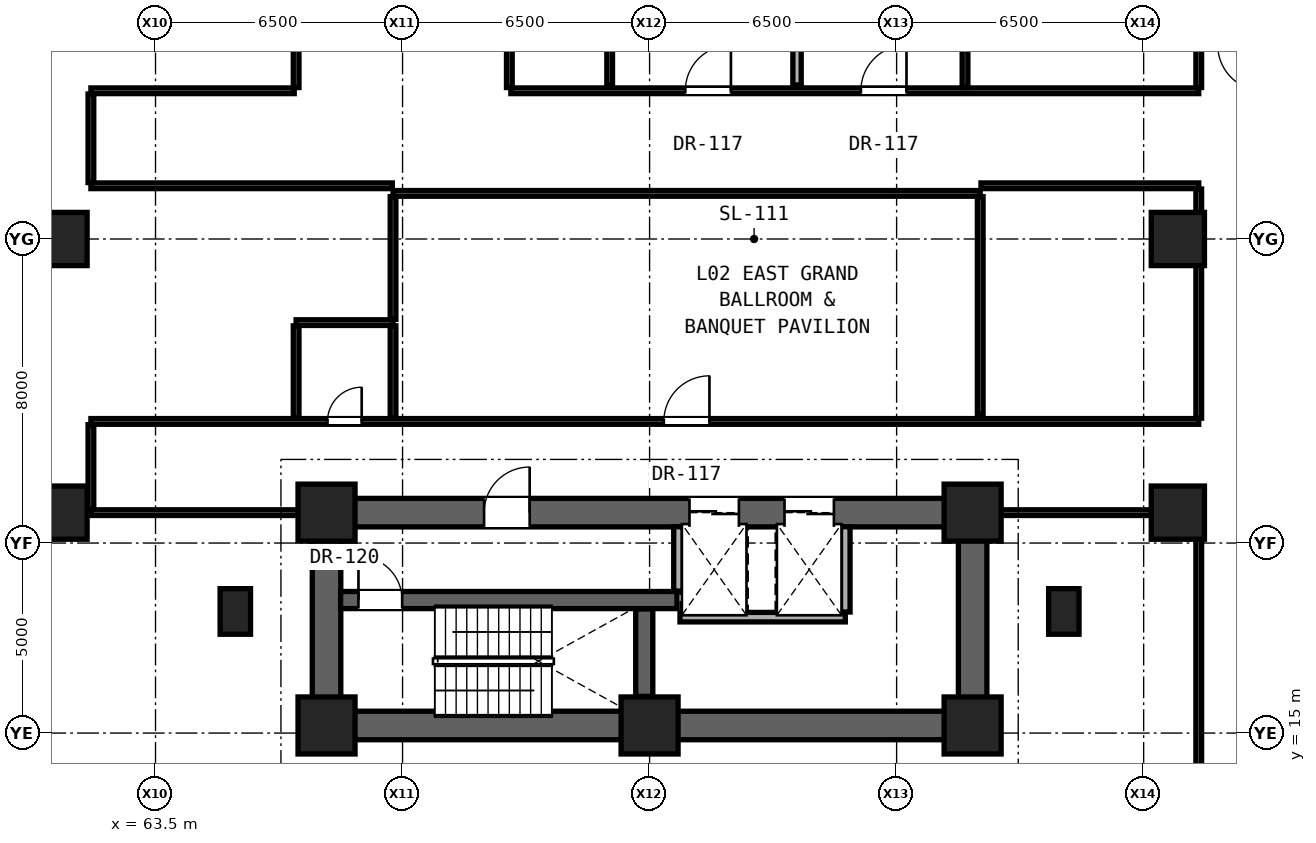
"""IFC4 building model, lengths in metres.
Left out: names, types, materials, properties, quantities, classifications, styles, units other than length and angle.
Written with IfcOpenShell. Run it as: python <this file> out.ifc"""

import sys

from ifc_helpers import new_model, si_unit, direction, frame, frame_2d, origin, origin_2d, place, context, subcontext, project, spatial, rectangle, hollow_rectangle, extrude, element, fill, save


model = new_model("IFC4")
c1 = context("Model", 3, precision=1e-05, world=origin(), true_north=direction((0.0, 1.0)))
c2 = subcontext(c1, "Body", "Model", "MODEL_VIEW")
j1 = project(units=[si_unit("LENGTHUNIT", "METRE"), si_unit("PLANEANGLEUNIT", "RADIAN")], contexts=[c1])
p1 = place(None, origin())
s1 = spatial("IfcSite", under=j1, at=p1, CompositionType="ELEMENT")
p2 = place(p1, origin())
s2 = spatial("IfcBuilding", under=s1, at=p2, CompositionType="ELEMENT")
p3 = place(p2, frame((0.0, 0.0, 9.5)))
s3 = spatial("IfcBuildingStorey", under=s2, at=p3, CompositionType="ELEMENT", Elevation=9.5)
for number, where, z_axis, x_axis in (
    (1, (68.0, 15.2, 0.0), (0.0, 0.0, 1.0), (1.0, 0.0, 0.0)),
    (2, (76.5, 15.2, 0.0), (0.0, 0.0, 1.0), (1.0, 0.0, 0.0)),
    (3, (85.0, 15.2, 0.0), (0.0, 0.0, 1.0), (1.0, 0.0, 0.0)),
    (4, (68.0, 20.8, 0.0), (0.0, 0.0, 1.0), (1.0, 0.0, 0.0)),
    (5, (85.0, 20.8, 0.0), (0.0, 0.0, 1.0), (1.0, 0.0, 0.0)),
):
    element("IfcColumn", number, at=place(p3, frame(where, z_axis=z_axis, x_axis=x_axis)), inside=s3, PredefinedType="COLUMN", context=c2, shape_type="SweptSolid", body=[
        extrude(rectangle(XDim=1.5, YDim=1.5, at=origin_2d()), origin(), (0.0, 0.0, 1.0), 4.3),
    ])
for number, where, z_axis, x_axis in (
    (6, (61.0, 20.8, 0.0), (0.0, 0.0, 1.0), (1.0, 0.0, 0.0)),
    (7, (61.0, 28.0, 0.0), (0.0, 0.0, 1.0), (1.0, 0.0, 0.0)),
    (8, (90.4, 20.8, 0.0), (0.0, 0.0, 1.0), (1.0, 0.0, 0.0)),
    (9, (90.4, 28.0, 0.0), (0.0, 0.0, 1.0), (1.0, 0.0, 0.0)),
):
    element("IfcColumn", number, at=place(p3, frame(where, z_axis=z_axis, x_axis=x_axis)), inside=s3, PredefinedType="COLUMN", context=c2, shape_type="SweptSolid", body=[
        extrude(hollow_rectangle(XDim=1.4, YDim=1.4, WallThickness=0.08, at=origin_2d()), origin(), (0.0, 0.0, 1.0), 4.3),
    ])
for number, where, z_axis, x_axis in (
    (10, (65.6, 18.2, 0.0), (0.0, 0.0, 1.0), (1.0, 0.0, 0.0)),
    (11, (87.4, 18.2, 0.0), (0.0, 0.0, 1.0), (1.0, 0.0, 0.0)),
):
    element("IfcColumn", number, at=place(p3, frame(where, z_axis=z_axis, x_axis=x_axis)), inside=s3, PredefinedType="PILASTER", context=c2, shape_type="SweptSolid", body=[
        extrude(rectangle(XDim=0.8, YDim=1.2, at=origin_2d()), origin(), (0.0, 0.0, 1.0), 4.3),
    ])
p4 = place(p3, frame((68.0, 15.2, 0.0), z_axis=(0.0, 0.0, 1.0), x_axis=(1.0, 0.0, 0.0)))
e12 = element("IfcWall", 12, at=p4, inside=s3, PredefinedType="SHEAR", context=c2, shape_type="SweptSolid", body=[
    extrude(rectangle(XDim=17.0, YDim=0.75, at=frame_2d((8.5, 0.0))), origin(), (0.0, 0.0, 1.0), 3.98),
])
for number, where, z_axis, x_axis in (
    (13, (68.0, 15.2, 0.0), (0.0, 0.0, 1.0), (0.0, 1.0, 0.0)),
    (14, (85.0, 15.2, 0.0), (0.0, 0.0, 1.0), (0.0, 1.0, 0.0)),
):
    element("IfcWall", number, at=place(p3, frame(where, z_axis=z_axis, x_axis=x_axis)), inside=s3, PredefinedType="SHEAR", context=c2, shape_type="SweptSolid", body=[
        extrude(rectangle(XDim=5.6, YDim=0.75, at=frame_2d((2.8, 0.0))), origin(), (0.0, 0.0, 1.0), 3.98),
    ])
p5 = place(p3, frame((68.0, 20.8, 0.0), z_axis=(0.0, 0.0, 1.0), x_axis=(1.0, 0.0, 0.0)))
e15 = element("IfcWall", 15, at=p5, inside=s3, PredefinedType="SHEAR", context=c2, shape_type="SweptSolid", body=[
    extrude(rectangle(XDim=17.0, YDim=0.75, at=frame_2d((8.5, 0.0))), origin(), (0.0, 0.0, 1.0), 3.98),
])
p6 = place(p5, frame((4.145, 0.0, 0.0)))
e16 = element("IfcOpeningElement", 16, at=p6, cuts=e15, PredefinedType="OPENING", context=c2, shape_type="SweptSolid", body=[
    extrude(rectangle(XDim=1.2, YDim=2.25, at=frame_2d((0.6, 1.125))), frame((0.0, 0.385, 0.0), z_axis=(0.0, -1.0, 0.0), x_axis=(1.0, 0.0, 0.0)), (0.0, 0.0, 1.0), 0.77),
])
p7 = place(p5, frame((9.55, 0.0, 0.0)))
e17 = element("IfcOpeningElement", 17, at=p7, cuts=e15, PredefinedType="OPENING", context=c2, shape_type="SweptSolid", body=[
    extrude(rectangle(XDim=1.3, YDim=2.3, at=frame_2d((0.65, 1.15))), frame((0.0, 0.385, 0.0), z_axis=(0.0, -1.0, 0.0), x_axis=(1.0, 0.0, 0.0)), (0.0, 0.0, 1.0), 0.77),
])
p8 = place(p5, frame((12.05, 0.0, 0.0)))
e18 = element("IfcOpeningElement", 18, at=p8, cuts=e15, PredefinedType="OPENING", context=c2, shape_type="SweptSolid", body=[
    extrude(rectangle(XDim=1.3, YDim=2.3, at=frame_2d((0.65, 1.15))), frame((0.0, 0.385, 0.0), z_axis=(0.0, -1.0, 0.0), x_axis=(1.0, 0.0, 0.0)), (0.0, 0.0, 1.0), 0.77),
])
p9 = place(p3, frame((77.3, 18.05, 0.0), z_axis=(0.0, 0.0, 1.0), x_axis=(1.0, 0.0, 0.0)))
e19 = element("IfcWall", 19, at=p9, inside=s3, PredefinedType="SOLIDWALL", context=c2, shape_type="SweptSolid", body=[
    extrude(rectangle(XDim=4.35, YDim=0.25, at=frame_2d((2.175, 0.0))), origin(), (0.0, 0.0, 1.0), 3.98),
])
p10 = place(p3, frame((68.37, 18.5, 0.0), z_axis=(0.0, 0.0, 1.0), x_axis=(1.0, 0.0, 0.0)))
e20 = element("IfcWall", 20, at=p10, inside=s3, PredefinedType="SHEAR", context=c2, shape_type="SweptSolid", body=[
    extrude(rectangle(XDim=8.85, YDim=0.45, at=frame_2d((4.425, 0.0))), origin(), (0.0, 0.0, 1.0), 3.98),
])
p11 = place(p10, frame((0.47, 0.0, 0.0)))
e21 = element("IfcOpeningElement", 21, at=p11, cuts=e20, PredefinedType="OPENING", context=c2, shape_type="SweptSolid", body=[
    extrude(rectangle(XDim=1.15, YDim=2.2, at=frame_2d((0.575, 1.1))), frame((0.0, 0.235, 0.0), z_axis=(0.0, -1.0, 0.0), x_axis=(1.0, 0.0, 0.0)), (0.0, 0.0, 1.0), 0.47),
])
p12 = place(p3, frame((61.8, 20.8, 0.0), z_axis=(0.0, 0.0, 1.0), x_axis=(1.0, 0.0, 0.0)))
e22 = element("IfcWall", 22, at=p12, inside=s3, PredefinedType="PARTITIONING", context=c2, shape_type="SweptSolid", body=[
    extrude(rectangle(XDim=5.83, YDim=0.15, at=frame_2d((2.915, 0.0))), origin(), (0.0, 0.0, 1.0), 2.872),
])
p13 = place(p3, frame((85.37, 20.8, 0.0), z_axis=(0.0, 0.0, 1.0), x_axis=(1.0, 0.0, 0.0)))
e23 = element("IfcWall", 23, at=p13, inside=s3, PredefinedType="PARTITIONING", context=c2, shape_type="SweptSolid", body=[
    extrude(rectangle(XDim=5.58, YDim=0.15, at=frame_2d((2.79, 0.0))), origin(), (0.0, 0.0, 1.0), 2.872),
])
p14 = place(p3, frame((61.8, 23.2, 0.0), z_axis=(0.0, 0.0, 1.0), x_axis=(1.0, 0.0, 0.0)))
e24 = element("IfcWall", 24, at=p14, inside=s3, PredefinedType="PARTITIONING", context=c2, shape_type="SweptSolid", body=[
    extrude(rectangle(XDim=29.15, YDim=0.15, at=frame_2d((14.575, 0.0))), origin(), (0.0, 0.0, 1.0), 3.045),
])
p15 = place(p14, frame((6.225, 0.0, 0.0)))
e25 = element("IfcOpeningElement", 25, at=p15, cuts=e24, PredefinedType="OPENING", context=c2, shape_type="SweptSolid", body=[
    extrude(rectangle(XDim=0.9, YDim=2.1, at=frame_2d((0.45, 1.05))), frame((0.0, 0.085, 0.0), z_axis=(0.0, -1.0, 0.0), x_axis=(1.0, 0.0, 0.0)), (0.0, 0.0, 1.0), 0.17),
])
p16 = place(p14, frame((15.075, 0.0, 0.0)))
e26 = element("IfcOpeningElement", 26, at=p16, cuts=e24, PredefinedType="OPENING", context=c2, shape_type="SweptSolid", body=[
    extrude(rectangle(XDim=1.2, YDim=2.25, at=frame_2d((0.6, 1.125))), frame((0.0, 0.085, 0.0), z_axis=(0.0, -1.0, 0.0), x_axis=(1.0, 0.0, 0.0)), (0.0, 0.0, 1.0), 0.17),
])
p17 = place(p3, frame((67.2, 25.8, 0.0), z_axis=(0.0, 0.0, 1.0), x_axis=(1.0, 0.0, 0.0)))
e27 = element("IfcWall", 27, at=p17, inside=s3, PredefinedType="PARTITIONING", context=c2, shape_type="SweptSolid", body=[
    extrude(rectangle(XDim=2.55, YDim=0.15, at=frame_2d((1.275, 0.0))), origin(), (0.0, 0.0, 1.0), 3.045),
])
p18 = place(p3, frame((69.75, 29.2, 0.0), z_axis=(0.0, 0.0, 1.0), x_axis=(1.0, 0.0, 0.0)))
e28 = element("IfcWall", 28, at=p18, inside=s3, PredefinedType="PARTITIONING", context=c2, shape_type="SweptSolid", body=[
    extrude(rectangle(XDim=15.45, YDim=0.15, at=frame_2d((7.725, 0.0))), origin(), (0.0, 0.0, 1.0), 3.045),
])
p19 = place(p3, frame((61.8, 29.4, 0.0), z_axis=(0.0, 0.0, 1.0), x_axis=(1.0, 0.0, 0.0)))
e29 = element("IfcWall", 29, at=p19, inside=s3, PredefinedType="PARTITIONING", context=c2, shape_type="SweptSolid", body=[
    extrude(rectangle(XDim=7.93, YDim=0.15, at=frame_2d((3.965, 0.0))), origin(), (0.0, 0.0, 1.0), 3.045),
])
p20 = place(p3, frame((85.22, 29.4, 0.0), z_axis=(0.0, 0.0, 1.0), x_axis=(1.0, 0.0, 0.0)))
e30 = element("IfcWall", 30, at=p20, inside=s3, PredefinedType="PARTITIONING", context=c2, shape_type="SweptSolid", body=[
    extrude(rectangle(XDim=5.73, YDim=0.15, at=frame_2d((2.865, 0.0))), origin(), (0.0, 0.0, 1.0), 3.116),
])
p21 = place(p3, frame((61.8, 31.9, 0.0), z_axis=(0.0, 0.0, 1.0), x_axis=(1.0, 0.0, 0.0)))
e31 = element("IfcWall", 31, at=p21, inside=s3, PredefinedType="PARTITIONING", context=c2, shape_type="SweptSolid", body=[
    extrude(rectangle(XDim=5.35, YDim=0.15, at=frame_2d((2.675, 0.0))), origin(), (0.0, 0.0, 1.0), 3.98),
])
p22 = place(p3, frame((72.85, 31.9, 0.0), z_axis=(0.0, 0.0, 1.0), x_axis=(1.0, 0.0, 0.0)))
e32 = element("IfcWall", 32, at=p22, inside=s3, PredefinedType="PARTITIONING", context=c2, shape_type="SweptSolid", body=[
    extrude(rectangle(XDim=18.1, YDim=0.15, at=frame_2d((9.05, 0.0))), origin(), (0.0, 0.0, 1.0), 3.045),
])
p23 = place(p22, frame((9.21, 0.0, 0.0)))
e33 = element("IfcOpeningElement", 33, at=p23, cuts=e32, PredefinedType="OPENING", context=c2, shape_type="SweptSolid", body=[
    extrude(rectangle(XDim=1.2, YDim=2.25, at=frame_2d((0.6, 1.125))), frame((0.0, 0.085, 0.0), z_axis=(0.0, -1.0, 0.0), x_axis=(1.0, 0.0, 0.0)), (0.0, 0.0, 1.0), 0.17),
])
p24 = place(p22, frame((4.59, 0.0, 0.0)))
e34 = element("IfcOpeningElement", 34, at=p24, cuts=e32, PredefinedType="OPENING", context=c2, shape_type="SweptSolid", body=[
    extrude(rectangle(XDim=1.2, YDim=2.25, at=frame_2d((0.6, 1.125))), frame((0.0, 0.085, 0.0), z_axis=(0.0, -1.0, 0.0), x_axis=(1.0, 0.0, 0.0)), (0.0, 0.0, 1.0), 0.17),
])
p25 = place(p3, frame((61.8, 20.885, 0.0), z_axis=(0.0, 0.0, 1.0), x_axis=(0.0, 1.0, 0.0)))
e35 = element("IfcWall", 35, at=p25, inside=s3, PredefinedType="PARTITIONING", context=c2, shape_type="SweptSolid", body=[
    extrude(rectangle(XDim=2.23, YDim=0.15, at=frame_2d((1.115, 0.0))), origin(), (0.0, 0.0, 1.0), 2.872),
])
p26 = place(p3, frame((61.8, 29.485, 0.0), z_axis=(0.0, 0.0, 1.0), x_axis=(0.0, 1.0, 0.0)))
e36 = element("IfcWall", 36, at=p26, inside=s3, PredefinedType="PARTITIONING", context=c2, shape_type="SweptSolid", body=[
    extrude(rectangle(XDim=2.33, YDim=0.15, at=frame_2d((1.165, 0.0))), origin(), (0.0, 0.0, 1.0), 3.98),
])
p27 = place(p3, frame((67.2, 23.285, 0.0), z_axis=(0.0, 0.0, 1.0), x_axis=(0.0, 1.0, 0.0)))
e37 = element("IfcWall", 37, at=p27, inside=s3, PredefinedType="PARTITIONING", context=c2, shape_type="SweptSolid", body=[
    extrude(rectangle(XDim=2.43, YDim=0.15, at=frame_2d((1.215, 0.0))), origin(), (0.0, 0.0, 1.0), 3.98),
])
p28 = place(p3, frame((67.2, 31.985, 0.0), z_axis=(0.0, 0.0, 1.0), x_axis=(0.0, 1.0, 0.0)))
e38 = element("IfcWall", 38, at=p28, inside=s3, PredefinedType="PARTITIONING", context=c2, shape_type="SweptSolid", body=[
    extrude(rectangle(XDim=3.215, YDim=0.15, at=frame_2d((1.607, 0.0))), origin(), (0.0, 0.0, 1.0), 2.872),
])
p29 = place(p3, frame((69.75, 23.285, 0.0), z_axis=(0.0, 0.0, 1.0), x_axis=(0.0, 1.0, 0.0)))
e39 = element("IfcWall", 39, at=p29, inside=s3, PredefinedType="PARTITIONING", context=c2, shape_type="SweptSolid", body=[
    extrude(rectangle(XDim=2.43, YDim=0.15, at=frame_2d((1.215, 0.0))), origin(), (0.0, 0.0, 1.0), 3.98),
])
p30 = place(p3, frame((69.75, 25.885, 0.0), z_axis=(0.0, 0.0, 1.0), x_axis=(0.0, 1.0, 0.0)))
e40 = element("IfcWall", 40, at=p30, inside=s3, PredefinedType="PARTITIONING", context=c2, shape_type="SweptSolid", body=[
    extrude(rectangle(XDim=3.23, YDim=0.15, at=frame_2d((1.615, 0.0))), origin(), (0.0, 0.0, 1.0), 3.045),
])
p31 = place(p3, frame((72.81, 31.985, 0.0), z_axis=(0.0, 0.0, 1.0), x_axis=(0.0, 1.0, 0.0)))
e41 = element("IfcWall", 41, at=p31, inside=s3, PredefinedType="PARTITIONING", context=c2, shape_type="SweptSolid", body=[
    extrude(rectangle(XDim=2.845, YDim=0.15, at=frame_2d((1.422, 0.0))), origin(), (0.0, 0.0, 1.0), 3.98),
])
p32 = place(p31, frame((1.01, 0.0, 0.0)))
e42 = element("IfcOpeningElement", 42, at=p32, cuts=e41, PredefinedType="OPENING", context=c2, shape_type="SweptSolid", body=[
    extrude(rectangle(XDim=0.85, YDim=2.01, at=frame_2d((0.425, 1.005))), frame((0.0, 0.085, 0.0), z_axis=(0.0, -1.0, 0.0), x_axis=(1.0, 0.0, 0.0)), (0.0, 0.0, 1.0), 0.17),
])
p33 = place(p3, frame((75.45, 32.05, 0.0), z_axis=(0.0, 0.0, 1.0), x_axis=(0.0, 1.0, 0.0)))
e43 = element("IfcWall", 43, at=p33, inside=s3, PredefinedType="PARTITIONING", context=c2, shape_type="SweptSolid", body=[
    extrude(rectangle(XDim=2.78, YDim=0.15, at=frame_2d((1.39, 0.0))), origin(), (0.0, 0.0, 1.0), 3.98),
])
p34 = place(p3, frame((76.36, 15.965, 0.0), z_axis=(0.0, 0.0, 1.0), x_axis=(0.0, 1.0, 0.0)))
e44 = element("IfcWall", 44, at=p34, inside=s3, PredefinedType="SHEAR", context=c2, shape_type="SweptSolid", body=[
    extrude(rectangle(XDim=2.3, YDim=0.45, at=frame_2d((1.15, 0.0))), origin(), (0.0, 0.0, 1.0), 3.98),
])
p35 = place(p3, frame((77.26, 18.735, 0.0), z_axis=(0.0, 0.0, 1.0), x_axis=(0.0, 1.0, 0.0)))
e45 = element("IfcWall", 45, at=p35, inside=s3, PredefinedType="SOLIDWALL", context=c2, shape_type="SweptSolid", body=[
    extrude(rectangle(XDim=1.695, YDim=0.25, at=frame_2d((0.847, 0.0))), origin(), (0.0, 0.0, 1.0), 3.98),
])
p36 = place(p3, frame((80.38, 32.05, 0.0), z_axis=(0.0, 0.0, 1.0), x_axis=(0.0, 1.0, 0.0)))
e46 = element("IfcWall", 46, at=p36, inside=s3, PredefinedType="SOLIDWALL", context=c2, shape_type="SweptSolid", body=[
    extrude(rectangle(XDim=2.78, YDim=0.22, at=frame_2d((1.39, 0.0))), origin(), (0.0, 0.0, 1.0), 3.98),
])
p37 = place(p3, frame((81.65, 18.185, 0.0), z_axis=(0.0, 0.0, 1.0), x_axis=(0.0, 1.0, 0.0)))
e47 = element("IfcWall", 47, at=p37, inside=s3, PredefinedType="SOLIDWALL", context=c2, shape_type="SweptSolid", body=[
    extrude(rectangle(XDim=2.245, YDim=0.25, at=frame_2d((1.123, 0.0))), origin(), (0.0, 0.0, 1.0), 3.98),
])
p38 = place(p3, frame((84.8, 31.985, 0.0), z_axis=(0.0, 0.0, 1.0), x_axis=(0.0, 1.0, 0.0)))
e48 = element("IfcWall", 48, at=p38, inside=s3, PredefinedType="PARTITIONING", context=c2, shape_type="SweptSolid", body=[
    extrude(rectangle(XDim=2.845, YDim=0.15, at=frame_2d((1.422, 0.0))), origin(), (0.0, 0.0, 1.0), 3.045),
])
p39 = place(p3, frame((85.2, 23.4, 0.0), z_axis=(0.0, 0.0, 1.0), x_axis=(0.0, 1.0, 0.0)))
e49 = element("IfcWall", 49, at=p39, inside=s3, PredefinedType="PARTITIONING", context=c2, shape_type="SweptSolid", body=[
    extrude(rectangle(XDim=5.715, YDim=0.15, at=frame_2d((2.857, 0.0))), origin(), (0.0, 0.0, 1.0), 3.045),
])
p40 = place(p3, frame((90.95, 12.735, 0.0), z_axis=(0.0, 0.0, 1.0), x_axis=(0.0, 1.0, 0.0)))
e50 = element("IfcWall", 50, at=p40, inside=s3, PredefinedType="PARTITIONING", context=c2, shape_type="SweptSolid", body=[
    extrude(rectangle(XDim=7.98, YDim=0.15, at=frame_2d((3.99, 0.0))), origin(), (0.0, 0.0, 1.0), 3.116),
])
p41 = place(p3, frame((90.95, 23.285, 0.0), z_axis=(0.0, 0.0, 1.0), x_axis=(0.0, 1.0, 0.0)))
e51 = element("IfcWall", 51, at=p41, inside=s3, PredefinedType="PARTITIONING", context=c2, shape_type="SweptSolid", body=[
    extrude(rectangle(XDim=6.03, YDim=0.15, at=frame_2d((3.015, 0.0))), origin(), (0.0, 0.0, 1.0), 3.199),
])
p42 = place(p3, frame((90.95, 31.985, 0.0), z_axis=(0.0, 0.0, 1.0), x_axis=(0.0, 1.0, 0.0)))
e52 = element("IfcWall", 52, at=p42, inside=s3, PredefinedType="PARTITIONING", context=c2, shape_type="SweptSolid", body=[
    extrude(rectangle(XDim=9.13, YDim=0.15, at=frame_2d((4.565, 0.0))), origin(), (0.0, 0.0, 1.0), 3.116),
])
p43 = place(p23, origin())
e53 = element("IfcDoor", 53, at=p43, inside=s3, OperationType="SINGLE_SWING_RIGHT", PredefinedType="DOOR", context=c2, shape_type="SweptSolid", body=[
    extrude(rectangle(XDim=1.2, YDim=2.25, at=frame_2d((0.6, 1.125))), frame((0.0, 0.025, 0.0), z_axis=(0.0, -1.0, 0.0), x_axis=(1.0, 0.0, 0.0)), (0.0, 0.0, 1.0), 0.05),
])
fill(e33, e53)
p44 = place(p24, origin())
e54 = element("IfcDoor", 54, at=p44, inside=s3, OperationType="SINGLE_SWING_RIGHT", PredefinedType="DOOR", context=c2, shape_type="SweptSolid", body=[
    extrude(rectangle(XDim=1.2, YDim=2.25, at=frame_2d((0.6, 1.125))), frame((0.0, 0.025, 0.0), z_axis=(0.0, -1.0, 0.0), x_axis=(1.0, 0.0, 0.0)), (0.0, 0.0, 1.0), 0.05),
])
fill(e34, e54)
p45 = place(p6, origin())
e55 = element("IfcDoor", 55, at=p45, inside=s3, OperationType="SINGLE_SWING_RIGHT", PredefinedType="DOOR", context=c2, shape_type="SweptSolid", body=[
    extrude(rectangle(XDim=1.2, YDim=2.25, at=frame_2d((0.6, 1.125))), frame((0.0, 0.025, 0.0), z_axis=(0.0, -1.0, 0.0), x_axis=(1.0, 0.0, 0.0)), (0.0, 0.0, 1.0), 0.05),
])
fill(e16, e55)
p46 = place(p11, origin())
e56 = element("IfcDoor", 56, at=p46, inside=s3, OperationType="SINGLE_SWING_LEFT", PredefinedType="DOOR", context=c2, shape_type="SweptSolid", body=[
    extrude(rectangle(XDim=1.15, YDim=2.2, at=frame_2d((0.575, 1.1))), frame((0.0, 0.025, 0.0), z_axis=(0.0, -1.0, 0.0), x_axis=(1.0, 0.0, 0.0)), (0.0, 0.0, 1.0), 0.05),
])
fill(e21, e56)
p47 = place(p15, origin())
e57 = element("IfcDoor", 57, at=p47, inside=s3, OperationType="SINGLE_SWING_RIGHT", PredefinedType="DOOR", context=c2, shape_type="SweptSolid", body=[
    extrude(rectangle(XDim=0.9, YDim=2.1, at=frame_2d((0.45, 1.05))), frame((0.0, 0.025, 0.0), z_axis=(0.0, -1.0, 0.0), x_axis=(1.0, 0.0, 0.0)), (0.0, 0.0, 1.0), 0.05),
])
fill(e25, e57)
p48 = place(p16, origin())
e58 = element("IfcDoor", 58, at=p48, inside=s3, OperationType="SINGLE_SWING_RIGHT", PredefinedType="DOOR", context=c2, shape_type="SweptSolid", body=[
    extrude(rectangle(XDim=1.2, YDim=2.25, at=frame_2d((0.6, 1.125))), frame((0.0, 0.025, 0.0), z_axis=(0.0, -1.0, 0.0), x_axis=(1.0, 0.0, 0.0)), (0.0, 0.0, 1.0), 0.05),
])
fill(e26, e58)
p49 = place(p7, origin())
e59 = element("IfcDoor", 59, at=p49, inside=s3, OperationType="DOUBLE_DOOR_SLIDING", PredefinedType="DOOR", context=c2, shape_type="SweptSolid", body=[
    extrude(rectangle(XDim=1.3, YDim=2.3, at=frame_2d((0.65, 1.15))), frame((0.0, 0.025, 0.0), z_axis=(0.0, -1.0, 0.0), x_axis=(1.0, 0.0, 0.0)), (0.0, 0.0, 1.0), 0.05),
])
fill(e17, e59)
p50 = place(p8, origin())
e60 = element("IfcDoor", 60, at=p50, inside=s3, OperationType="DOUBLE_DOOR_SLIDING", PredefinedType="DOOR", context=c2, shape_type="SweptSolid", body=[
    extrude(rectangle(XDim=1.3, YDim=2.3, at=frame_2d((0.65, 1.15))), frame((0.0, 0.025, 0.0), z_axis=(0.0, -1.0, 0.0), x_axis=(1.0, 0.0, 0.0)), (0.0, 0.0, 1.0), 0.05),
])
fill(e18, e60)
save(model, sys.argv[1])
